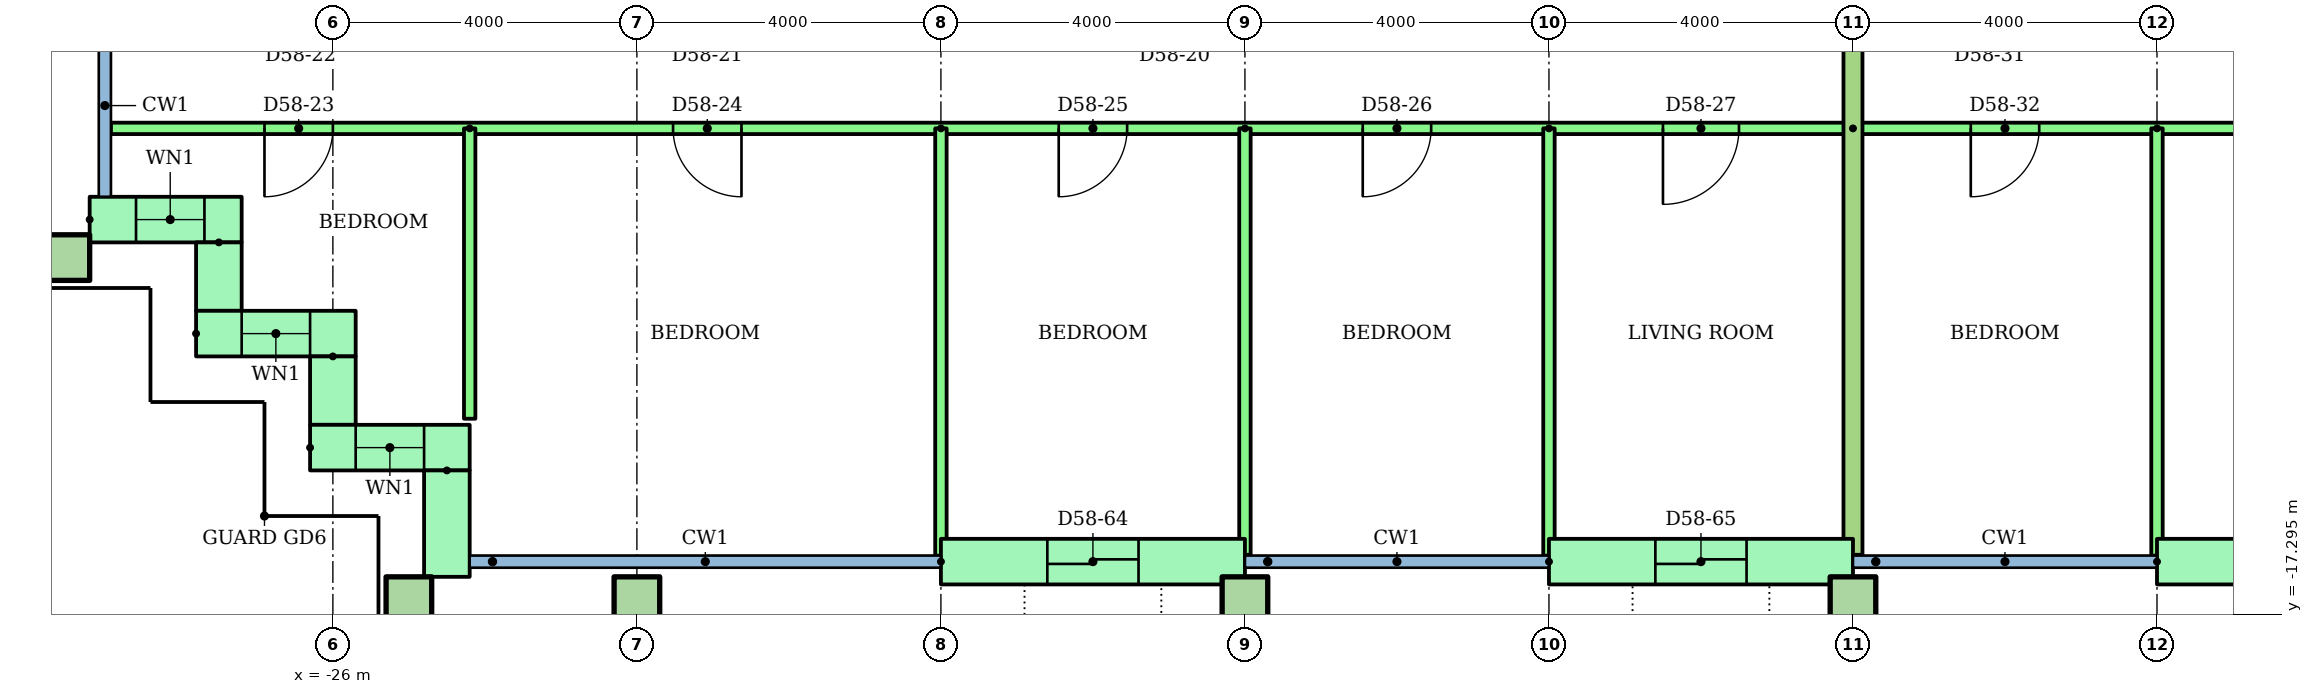
"""IFC4 building model, lengths in metres.
Left out: names, types, materials, properties, quantities, classifications, styles, units other than length and angle.
Written with IfcOpenShell. Run it as: python <this file> out.ifc"""

import sys

from ifc_helpers import new_model, si_unit, direction, frame, frame_2d, origin, origin_2d, place, context, subcontext, project, spatial, rectangle, hollow_rectangle, extrude, element, fill, save


model = new_model("IFC4")
c1 = context("Model", 3, precision=1e-05, world=origin(), true_north=direction((0.0, 1.0)))
c2 = subcontext(c1, "Body", "Model", "MODEL_VIEW")
j1 = project(units=[si_unit("LENGTHUNIT", "METRE"), si_unit("PLANEANGLEUNIT", "RADIAN")], contexts=[c1])
p1 = place(None, origin())
s1 = spatial("IfcSite", under=j1, at=p1, CompositionType="ELEMENT")
p2 = place(p1, origin())
s2 = spatial("IfcBuilding", under=s1, at=p2, CompositionType="ELEMENT")
p3 = place(p2, frame((0.0, 0.0, 223.6)))
s3 = spatial("IfcBuildingStorey", under=s2, at=p3, CompositionType="ELEMENT", Elevation=223.6)
for number, where in (
    (1, (-25.0, -17.1, 0.0)),
    (2, (-22.0, -17.1, 0.0)),
    (3, (-14.0, -17.1, 0.0)),
    (4, (-6.0, -17.1, 0.0)),
    (5, (-29.5, -12.6, 0.0)),
):
    element("IfcColumn", number, at=place(p3, frame(where)), inside=s3, PredefinedType="COLUMN", context=c2, shape_type="SweptSolid", body=[
        extrude(hollow_rectangle(XDim=0.6, YDim=0.6, WallThickness=0.03, at=origin_2d()), origin(), (0.0, 0.0, 1.0), 3.2),
    ])
p4 = place(p3, frame((-29.2, -12.1, 0.0)))
e6 = element("IfcWall", 6, at=p4, inside=s3, PredefinedType="STANDARD", context=c2, shape_type="SweptSolid", body=[
    extrude(rectangle(XDim=2.0, YDim=0.6, at=frame_2d((1.0, 0.0))), origin(), (0.0, 0.0, 1.0), 2.92),
])
p5 = place(p4, frame((0.61, 0.0, 0.9)))
e7 = element("IfcOpeningElement", 7, at=p5, cuts=e6, PredefinedType="OPENING", context=c2, shape_type="SweptSolid", body=[
    extrude(rectangle(XDim=0.9, YDim=1.5, at=frame_2d((0.45, 0.75))), frame((0.0, 0.31, 0.0), z_axis=(0.0, -1.0, 0.0), x_axis=(1.0, 0.0, 0.0)), (0.0, 0.0, 1.0), 0.62),
])
p6 = place(p3, frame((-27.5, -12.4, 0.0), z_axis=(0.0, 0.0, 1.0), x_axis=(0.0, -1.0, 0.0)))
e8 = element("IfcWall", 8, at=p6, inside=s3, PredefinedType="STANDARD", context=c2, shape_type="SweptSolid", body=[
    extrude(rectangle(XDim=0.9, YDim=0.6, at=frame_2d((0.45, 0.0))), origin(), (0.0, 0.0, 1.0), 2.92),
])
p7 = place(p3, frame((-27.8, -13.6, 0.0)))
e9 = element("IfcWall", 9, at=p7, inside=s3, PredefinedType="STANDARD", context=c2, shape_type="SweptSolid", body=[
    extrude(rectangle(XDim=2.1, YDim=0.6, at=frame_2d((1.05, 0.0))), origin(), (0.0, 0.0, 1.0), 2.92),
])
p8 = place(p7, frame((0.6, 0.0, 0.9)))
e10 = element("IfcOpeningElement", 10, at=p8, cuts=e9, PredefinedType="OPENING", context=c2, shape_type="SweptSolid", body=[
    extrude(rectangle(XDim=0.9, YDim=1.5, at=frame_2d((0.45, 0.75))), frame((0.0, 0.31, 0.0), z_axis=(0.0, -1.0, 0.0), x_axis=(1.0, 0.0, 0.0)), (0.0, 0.0, 1.0), 0.62),
])
p9 = place(p3, frame((-26.0, -13.9, 0.0), z_axis=(0.0, 0.0, 1.0), x_axis=(0.0, -1.0, 0.0)))
e11 = element("IfcWall", 11, at=p9, inside=s3, PredefinedType="STANDARD", context=c2, shape_type="SweptSolid", body=[
    extrude(rectangle(XDim=0.9, YDim=0.6, at=frame_2d((0.45, 0.0))), origin(), (0.0, 0.0, 1.0), 2.92),
])
p10 = place(p3, frame((-26.3, -15.1, 0.0)))
e12 = element("IfcWall", 12, at=p10, inside=s3, PredefinedType="STANDARD", context=c2, shape_type="SweptSolid", body=[
    extrude(rectangle(XDim=2.1, YDim=0.6, at=frame_2d((1.05, 0.0))), origin(), (0.0, 0.0, 1.0), 2.92),
])
p11 = place(p10, frame((0.6, 0.0, 0.9)))
e13 = element("IfcOpeningElement", 13, at=p11, cuts=e12, PredefinedType="OPENING", context=c2, shape_type="SweptSolid", body=[
    extrude(rectangle(XDim=0.9, YDim=1.5, at=frame_2d((0.45, 0.75))), frame((0.0, 0.31, 0.0), z_axis=(0.0, -1.0, 0.0), x_axis=(1.0, 0.0, 0.0)), (0.0, 0.0, 1.0), 0.62),
])
p12 = place(p3, frame((-24.5, -15.4, 0.0), z_axis=(0.0, 0.0, 1.0), x_axis=(0.0, -1.0, 0.0)))
e14 = element("IfcWall", 14, at=p12, inside=s3, PredefinedType="STANDARD", context=c2, shape_type="SweptSolid", body=[
    extrude(rectangle(XDim=1.4, YDim=0.6, at=frame_2d((0.7, 0.0))), origin(), (0.0, 0.0, 1.0), 2.92),
])
p13 = place(p3, frame((-18.0, -16.6, 0.0)))
e15 = element("IfcWall", 15, at=p13, inside=s3, PredefinedType="STANDARD", context=c2, shape_type="SweptSolid", body=[
    extrude(rectangle(XDim=4.0, YDim=0.6, at=frame_2d((2.0, 0.0))), origin(), (0.0, 0.0, 1.0), 2.92),
])
p14 = place(p13, frame((1.4, 0.0, 0.0)))
e16 = element("IfcOpeningElement", 16, at=p14, cuts=e15, PredefinedType="OPENING", context=c2, shape_type="SweptSolid", body=[
    extrude(rectangle(XDim=1.2, YDim=2.1, at=frame_2d((0.6, 1.05))), frame((0.0, 0.31, 0.0), z_axis=(0.0, -1.0, 0.0), x_axis=(1.0, 0.0, 0.0)), (0.0, 0.0, 1.0), 0.62),
])
p15 = place(p3, frame((-10.0, -16.6, 0.0)))
e17 = element("IfcWall", 17, at=p15, inside=s3, PredefinedType="STANDARD", context=c2, shape_type="SweptSolid", body=[
    extrude(rectangle(XDim=4.0, YDim=0.6, at=frame_2d((2.0, 0.0))), origin(), (0.0, 0.0, 1.0), 2.92),
])
p16 = place(p15, frame((1.4, 0.0, 0.0)))
e18 = element("IfcOpeningElement", 18, at=p16, cuts=e17, PredefinedType="OPENING", context=c2, shape_type="SweptSolid", body=[
    extrude(rectangle(XDim=1.2, YDim=2.1, at=frame_2d((0.6, 1.05))), frame((0.0, 0.31, 0.0), z_axis=(0.0, -1.0, 0.0), x_axis=(1.0, 0.0, 0.0)), (0.0, 0.0, 1.0), 0.62),
])
p17 = place(p3, frame((-2.0, -16.6, 0.0)))
e19 = element("IfcWall", 19, at=p17, inside=s3, PredefinedType="STANDARD", context=c2, shape_type="SweptSolid", body=[
    extrude(rectangle(XDim=4.0, YDim=0.6, at=frame_2d((2.0, 0.0))), origin(), (0.0, 0.0, 1.0), 2.92),
])
p18 = place(p17, frame((1.4, 0.0, 0.0)))
e20 = element("IfcOpeningElement", 20, at=p18, cuts=e19, PredefinedType="OPENING", context=c2, shape_type="SweptSolid", body=[
    extrude(rectangle(XDim=1.2, YDim=2.1, at=frame_2d((0.6, 1.05))), frame((0.0, 0.31, 0.0), z_axis=(0.0, -1.0, 0.0), x_axis=(1.0, 0.0, 0.0)), (0.0, 0.0, 1.0), 0.62),
])
p19 = place(p3, frame((-6.0, -10.9, 0.0), z_axis=(0.0, 0.0, 1.0), x_axis=(-1.0, 0.0, 0.0)))
e21 = element("IfcWall", 21, at=p19, inside=s3, PredefinedType="PARTITIONING", context=c2, shape_type="SweptSolid", body=[
    extrude(rectangle(XDim=22.92, YDim=0.15, at=frame_2d((11.46, 0.0))), origin(), (0.0, 0.0, 1.0), 2.4),
])
p20 = place(p19, frame((20.0, 0.0, 0.0)))
e22 = element("IfcOpeningElement", 22, at=p20, cuts=e21, PredefinedType="OPENING", context=c2, shape_type="SweptSolid", body=[
    extrude(rectangle(XDim=0.9, YDim=2.1, at=frame_2d((0.45, 1.05))), frame((0.0, 0.085, 0.0), z_axis=(0.0, -1.0, 0.0), x_axis=(1.0, 0.0, 0.0)), (0.0, 0.0, 1.0), 0.17),
])
p21 = place(p19, frame((14.624, 0.0, 0.0)))
e23 = element("IfcOpeningElement", 23, at=p21, cuts=e21, PredefinedType="OPENING", context=c2, shape_type="SweptSolid", body=[
    extrude(rectangle(XDim=0.9, YDim=2.1, at=frame_2d((0.45, 1.05))), frame((0.0, 0.085, 0.0), z_axis=(0.0, -1.0, 0.0), x_axis=(1.0, 0.0, 0.0)), (0.0, 0.0, 1.0), 0.17),
])
p22 = place(p19, frame((9.55, 0.0, 0.0)))
e24 = element("IfcOpeningElement", 24, at=p22, cuts=e21, PredefinedType="OPENING", context=c2, shape_type="SweptSolid", body=[
    extrude(rectangle(XDim=0.9, YDim=2.1, at=frame_2d((0.45, 1.05))), frame((0.0, 0.085, 0.0), z_axis=(0.0, -1.0, 0.0), x_axis=(1.0, 0.0, 0.0)), (0.0, 0.0, 1.0), 0.17),
])
p23 = place(p19, frame((5.55, 0.0, 0.0)))
e25 = element("IfcOpeningElement", 25, at=p23, cuts=e21, PredefinedType="OPENING", context=c2, shape_type="SweptSolid", body=[
    extrude(rectangle(XDim=0.9, YDim=2.1, at=frame_2d((0.45, 1.05))), frame((0.0, 0.085, 0.0), z_axis=(0.0, -1.0, 0.0), x_axis=(1.0, 0.0, 0.0)), (0.0, 0.0, 1.0), 0.17),
])
p24 = place(p19, frame((1.5, 0.0, 0.0)))
e26 = element("IfcOpeningElement", 26, at=p24, cuts=e21, PredefinedType="OPENING", context=c2, shape_type="SweptSolid", body=[
    extrude(rectangle(XDim=1.0, YDim=2.1, at=frame_2d((0.5, 1.05))), frame((0.0, 0.085, 0.0), z_axis=(0.0, -1.0, 0.0), x_axis=(1.0, 0.0, 0.0)), (0.0, 0.0, 1.0), 0.17),
])
p25 = place(p3, frame((-24.2, -10.9, 0.0), z_axis=(0.0, 0.0, 1.0), x_axis=(0.0, -1.0, 0.0)))
e27 = element("IfcWall", 27, at=p25, inside=s3, PredefinedType="PARTITIONING", context=c2, shape_type="SweptSolid", body=[
    extrude(rectangle(XDim=3.82, YDim=0.15, at=frame_2d((1.91, 0.0))), origin(), (0.0, 0.0, 1.0), 2.4),
])
p26 = place(p3, frame((-18.0, -10.9, 0.0), z_axis=(0.0, 0.0, 1.0), x_axis=(0.0, -1.0, 0.0)))
e28 = element("IfcWall", 28, at=p26, inside=s3, PredefinedType="PARTITIONING", context=c2, shape_type="SweptSolid", body=[
    extrude(rectangle(XDim=5.621, YDim=0.15, at=frame_2d((2.811, 0.0))), origin(), (0.0, 0.0, 1.0), 2.4),
])
p27 = place(p3, frame((-14.0, -10.9, 0.0), z_axis=(0.0, 0.0, 1.0), x_axis=(0.0, -1.0, 0.0)))
e29 = element("IfcWall", 29, at=p27, inside=s3, PredefinedType="PARTITIONING", context=c2, shape_type="SweptSolid", body=[
    extrude(rectangle(XDim=5.61, YDim=0.15, at=frame_2d((2.805, 0.0))), origin(), (0.0, 0.0, 1.0), 2.4),
])
p28 = place(p3, frame((-10.0, -10.9, 0.0), z_axis=(0.0, 0.0, 1.0), x_axis=(0.0, -1.0, 0.0)))
e30 = element("IfcWall", 30, at=p28, inside=s3, PredefinedType="PARTITIONING", context=c2, shape_type="SweptSolid", body=[
    extrude(rectangle(XDim=5.621, YDim=0.15, at=frame_2d((2.811, 0.0))), origin(), (0.0, 0.0, 1.0), 2.4),
])
p29 = place(p3, frame((2.0, -10.9, 0.0), z_axis=(0.0, 0.0, 1.0), x_axis=(-1.0, 0.0, 0.0)))
e31 = element("IfcWall", 31, at=p29, inside=s3, PredefinedType="PARTITIONING", context=c2, shape_type="SweptSolid", body=[
    extrude(rectangle(XDim=8.0, YDim=0.15, at=frame_2d((4.0, 0.0))), origin(), (0.0, 0.0, 1.0), 2.4),
])
p30 = place(p29, frame((5.55, 0.0, 0.0)))
e32 = element("IfcOpeningElement", 32, at=p30, cuts=e31, PredefinedType="OPENING", context=c2, shape_type="SweptSolid", body=[
    extrude(rectangle(XDim=0.9, YDim=2.1, at=frame_2d((0.45, 1.05))), frame((0.0, 0.085, 0.0), z_axis=(0.0, -1.0, 0.0), x_axis=(1.0, 0.0, 0.0)), (0.0, 0.0, 1.0), 0.17),
])
p31 = place(p29, frame((1.5, 0.0, 0.0)))
e33 = element("IfcOpeningElement", 33, at=p31, cuts=e31, PredefinedType="OPENING", context=c2, shape_type="SweptSolid", body=[
    extrude(rectangle(XDim=1.0, YDim=2.1, at=frame_2d((0.5, 1.05))), frame((0.0, 0.085, 0.0), z_axis=(0.0, -1.0, 0.0), x_axis=(1.0, 0.0, 0.0)), (0.0, 0.0, 1.0), 0.17),
])
p32 = place(p3, frame((-2.0, -10.9, 0.0), z_axis=(0.0, 0.0, 1.0), x_axis=(0.0, -1.0, 0.0)))
e34 = element("IfcWall", 34, at=p32, inside=s3, PredefinedType="PARTITIONING", context=c2, shape_type="SweptSolid", body=[
    extrude(rectangle(XDim=5.621, YDim=0.15, at=frame_2d((2.811, 0.0))), origin(), (0.0, 0.0, 1.0), 2.4),
])
p33 = place(p3, frame((-6.0, -1.4, 0.0), z_axis=(0.0, 0.0, 1.0), x_axis=(0.0, -1.0, 0.0)))
e35 = element("IfcWall", 35, at=p33, inside=s3, PredefinedType="PARTITIONING", context=c2, shape_type="SweptSolid", body=[
    extrude(rectangle(XDim=15.11, YDim=0.25, at=frame_2d((7.555, 0.0))), origin(), (0.0, 0.0, 1.0), 2.4),
])
p34 = place(p5, origin())
e36 = element("IfcWindow", 36, at=p34, inside=s3, PartitioningType="SINGLE_PANEL", PredefinedType="WINDOW", context=c2, shape_type="SweptSolid", body=[
    extrude(rectangle(XDim=0.9, YDim=1.5, at=frame_2d((0.45, 0.75))), frame((0.0, 0.03, 0.0), z_axis=(0.0, -1.0, 0.0), x_axis=(1.0, 0.0, 0.0)), (0.0, 0.0, 1.0), 0.06),
])
fill(e7, e36)
p35 = place(p8, origin())
e37 = element("IfcWindow", 37, at=p35, inside=s3, PartitioningType="SINGLE_PANEL", PredefinedType="WINDOW", context=c2, shape_type="SweptSolid", body=[
    extrude(rectangle(XDim=0.9, YDim=1.5, at=frame_2d((0.45, 0.75))), frame((0.0, 0.03, 0.0), z_axis=(0.0, -1.0, 0.0), x_axis=(1.0, 0.0, 0.0)), (0.0, 0.0, 1.0), 0.06),
])
fill(e10, e37)
p36 = place(p11, origin())
e38 = element("IfcWindow", 38, at=p36, inside=s3, PartitioningType="SINGLE_PANEL", PredefinedType="WINDOW", context=c2, shape_type="SweptSolid", body=[
    extrude(rectangle(XDim=0.9, YDim=1.5, at=frame_2d((0.45, 0.75))), frame((0.0, 0.03, 0.0), z_axis=(0.0, -1.0, 0.0), x_axis=(1.0, 0.0, 0.0)), (0.0, 0.0, 1.0), 0.06),
])
fill(e13, e38)
p37 = place(p20, origin())
e39 = element("IfcDoor", 39, at=p37, inside=s3, OperationType="SINGLE_SWING_RIGHT", PredefinedType="DOOR", context=c2, shape_type="SweptSolid", body=[
    extrude(rectangle(XDim=0.9, YDim=2.1, at=frame_2d((0.45, 1.05))), frame((0.0, 0.025, 0.0), z_axis=(0.0, -1.0, 0.0), x_axis=(1.0, 0.0, 0.0)), (0.0, 0.0, 1.0), 0.05),
])
fill(e22, e39)
p38 = place(p21, origin())
e40 = element("IfcDoor", 40, at=p38, inside=s3, OperationType="SINGLE_SWING_LEFT", PredefinedType="DOOR", context=c2, shape_type="SweptSolid", body=[
    extrude(rectangle(XDim=0.9, YDim=2.1, at=frame_2d((0.45, 1.05))), frame((0.0, 0.025, 0.0), z_axis=(0.0, -1.0, 0.0), x_axis=(1.0, 0.0, 0.0)), (0.0, 0.0, 1.0), 0.05),
])
fill(e23, e40)
p39 = place(p22, origin())
e41 = element("IfcDoor", 41, at=p39, inside=s3, OperationType="SINGLE_SWING_RIGHT", PredefinedType="DOOR", context=c2, shape_type="SweptSolid", body=[
    extrude(rectangle(XDim=0.9, YDim=2.1, at=frame_2d((0.45, 1.05))), frame((0.0, 0.025, 0.0), z_axis=(0.0, -1.0, 0.0), x_axis=(1.0, 0.0, 0.0)), (0.0, 0.0, 1.0), 0.05),
])
fill(e24, e41)
p40 = place(p23, origin())
e42 = element("IfcDoor", 42, at=p40, inside=s3, OperationType="SINGLE_SWING_RIGHT", PredefinedType="DOOR", context=c2, shape_type="SweptSolid", body=[
    extrude(rectangle(XDim=0.9, YDim=2.1, at=frame_2d((0.45, 1.05))), frame((0.0, 0.025, 0.0), z_axis=(0.0, -1.0, 0.0), x_axis=(1.0, 0.0, 0.0)), (0.0, 0.0, 1.0), 0.05),
])
fill(e25, e42)
p41 = place(p24, origin())
e43 = element("IfcDoor", 43, at=p41, inside=s3, OperationType="SINGLE_SWING_RIGHT", PredefinedType="DOOR", context=c2, shape_type="SweptSolid", body=[
    extrude(rectangle(XDim=1.0, YDim=2.1, at=frame_2d((0.5, 1.05))), frame((0.0, 0.025, 0.0), z_axis=(0.0, -1.0, 0.0), x_axis=(1.0, 0.0, 0.0)), (0.0, 0.0, 1.0), 0.05),
])
fill(e26, e43)
p42 = place(p30, origin())
e44 = element("IfcDoor", 44, at=p42, inside=s3, OperationType="SINGLE_SWING_RIGHT", PredefinedType="DOOR", context=c2, shape_type="SweptSolid", body=[
    extrude(rectangle(XDim=0.9, YDim=2.1, at=frame_2d((0.45, 1.05))), frame((0.0, 0.025, 0.0), z_axis=(0.0, -1.0, 0.0), x_axis=(1.0, 0.0, 0.0)), (0.0, 0.0, 1.0), 0.05),
])
fill(e32, e44)
p43 = place(p14, origin())
e45 = element("IfcDoor", 45, at=p43, inside=s3, OperationType="SLIDING_TO_LEFT", PredefinedType="DOOR", context=c2, shape_type="SweptSolid", body=[
    extrude(rectangle(XDim=1.2, YDim=2.1, at=frame_2d((0.6, 1.05))), frame((0.0, 0.025, 0.0), z_axis=(0.0, -1.0, 0.0), x_axis=(1.0, 0.0, 0.0)), (0.0, 0.0, 1.0), 0.05),
])
fill(e16, e45)
p44 = place(p16, origin())
e46 = element("IfcDoor", 46, at=p44, inside=s3, OperationType="SLIDING_TO_LEFT", PredefinedType="DOOR", context=c2, shape_type="SweptSolid", body=[
    extrude(rectangle(XDim=1.2, YDim=2.1, at=frame_2d((0.6, 1.05))), frame((0.0, 0.025, 0.0), z_axis=(0.0, -1.0, 0.0), x_axis=(1.0, 0.0, 0.0)), (0.0, 0.0, 1.0), 0.05),
])
fill(e18, e46)
save(model, sys.argv[1])
